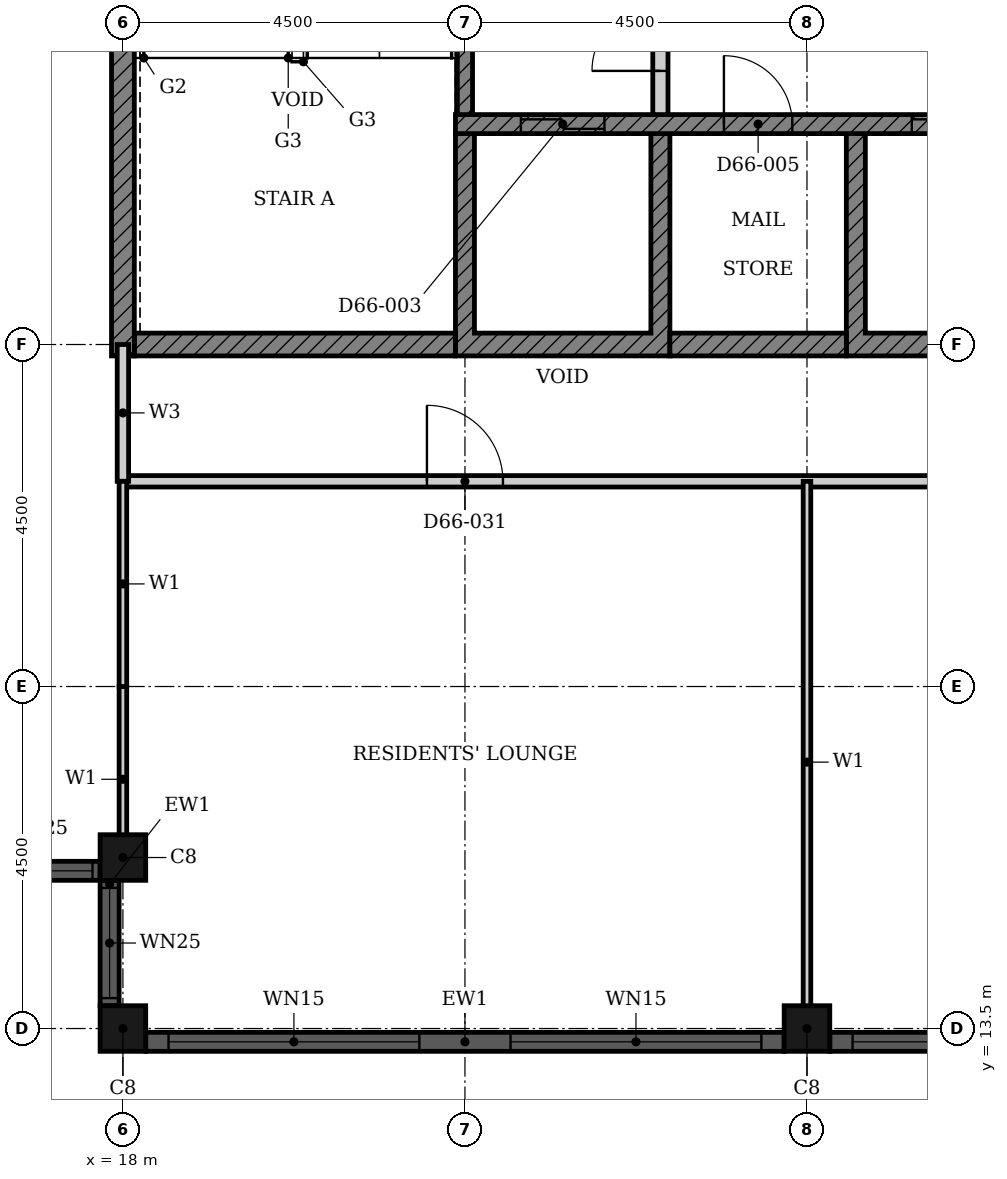
"""IFC4 building model, lengths in metres.
Left out: names, types, materials, properties, quantities, classifications, styles, units other than length and angle.
Written with IfcOpenShell. Run it as: python <this file> out.ifc"""

import sys

from ifc_helpers import new_model, si_unit, direction, frame, frame_2d, origin, origin_2d, place, context, subcontext, project, spatial, polyline, rectangle, hollow_rectangle, outline, extrude, element, fill, save


model = new_model("IFC4")
c1 = context("Model", 3, precision=1e-05, world=origin(), true_north=direction((0.0, 1.0)))
c2 = subcontext(c1, "Body", "Model", "MODEL_VIEW")
j1 = project(units=[si_unit("LENGTHUNIT", "METRE"), si_unit("PLANEANGLEUNIT", "RADIAN")], contexts=[c1])
p1 = place(None, origin())
s1 = spatial("IfcSite", under=j1, at=p1, CompositionType="ELEMENT")
p2 = place(p1, origin())
s2 = spatial("IfcBuilding", under=s1, at=p2, CompositionType="ELEMENT")
p3 = place(p2, frame((0.0, 0.0, 260.1)))
s3 = spatial("IfcBuildingStorey", under=s2, at=p3, CompositionType="ELEMENT", Elevation=260.1)
for number, where, z_axis, x_axis in (
    (1, (18.0, 15.75, 0.0), (0.0, 0.0, 1.0), (1.0, 0.0, 0.0)),
    (2, (18.0, 13.5, 0.0), (0.0, 0.0, 1.0), (1.0, 0.0, 0.0)),
    (3, (27.0, 13.5, 0.0), (0.0, 0.0, 1.0), (1.0, 0.0, 0.0)),
):
    element("IfcColumn", number, at=place(p3, frame(where, z_axis=z_axis, x_axis=x_axis)), inside=s3, PredefinedType="COLUMN", context=c2, shape_type="SweptSolid", body=[
        extrude(hollow_rectangle(XDim=0.6, YDim=0.6, WallThickness=0.02, at=origin_2d()), origin(), (0.0, 0.0, 1.0), 3.7),
    ])
p4 = place(p3, frame((16.05, 15.575, 0.0), z_axis=(0.0, 0.0, 1.0), x_axis=(1.0, 0.0, 0.0)))
e4 = element("IfcWall", 4, at=p4, inside=s3, PredefinedType="SOLIDWALL", context=c2, shape_type="SweptSolid", body=[
    extrude(rectangle(XDim=1.65, YDim=0.25, at=frame_2d((0.825, 0.0))), origin(), (0.0, 0.0, 1.0), 3.7),
])
p5 = place(p4, frame((0.1, 0.0, 0.9)))
e5 = element("IfcOpeningElement", 5, at=p5, cuts=e4, PredefinedType="OPENING", context=c2, shape_type="SweptSolid", body=[
    extrude(rectangle(XDim=1.45, YDim=1.85, at=frame_2d((0.725, 0.925))), frame((0.0, 0.135, 0.0), z_axis=(0.0, -1.0, 0.0), x_axis=(1.0, 0.0, 0.0)), (0.0, 0.0, 1.0), 0.27),
])
p6 = place(p3, frame((17.825, 15.45, 0.0), z_axis=(0.0, 0.0, 1.0), x_axis=(0.0, -1.0, 0.0)))
e6 = element("IfcWall", 6, at=p6, inside=s3, PredefinedType="SOLIDWALL", context=c2, shape_type="SweptSolid", body=[
    extrude(rectangle(XDim=1.65, YDim=0.25, at=frame_2d((0.825, 0.0))), origin(), (0.0, 0.0, 1.0), 3.7),
])
p7 = place(p6, frame((0.1, 0.0, 0.9)))
e7 = element("IfcOpeningElement", 7, at=p7, cuts=e6, PredefinedType="OPENING", context=c2, shape_type="SweptSolid", body=[
    extrude(rectangle(XDim=1.45, YDim=1.85, at=frame_2d((0.725, 0.925))), frame((0.0, 0.135, 0.0), z_axis=(0.0, -1.0, 0.0), x_axis=(1.0, 0.0, 0.0)), (0.0, 0.0, 1.0), 0.27),
])
p8 = place(p3, frame((18.3, 13.325, 0.0), z_axis=(0.0, 0.0, 1.0), x_axis=(1.0, 0.0, 0.0)))
e8 = element("IfcWall", 8, at=p8, inside=s3, PredefinedType="SOLIDWALL", context=c2, shape_type="SweptSolid", body=[
    extrude(rectangle(XDim=8.4, YDim=0.25, at=frame_2d((4.2, 0.0))), origin(), (0.0, 0.0, 1.0), 3.7),
])
p9 = place(p8, frame((0.3, 0.0, 0.45)))
e9 = element("IfcOpeningElement", 9, at=p9, cuts=e8, PredefinedType="OPENING", context=c2, shape_type="SweptSolid", body=[
    extrude(rectangle(XDim=3.3, YDim=2.3, at=frame_2d((1.65, 1.15))), frame((0.0, 0.135, 0.0), z_axis=(0.0, -1.0, 0.0), x_axis=(1.0, 0.0, 0.0)), (0.0, 0.0, 1.0), 0.27),
])
p10 = place(p8, frame((4.8, 0.0, 0.45)))
e10 = element("IfcOpeningElement", 10, at=p10, cuts=e8, PredefinedType="OPENING", context=c2, shape_type="SweptSolid", body=[
    extrude(rectangle(XDim=3.3, YDim=2.3, at=frame_2d((1.65, 1.15))), frame((0.0, 0.135, 0.0), z_axis=(0.0, -1.0, 0.0), x_axis=(1.0, 0.0, 0.0)), (0.0, 0.0, 1.0), 0.27),
])
p11 = place(p3, frame((27.3, 13.325, 0.0), z_axis=(0.0, 0.0, 1.0), x_axis=(1.0, 0.0, 0.0)))
e11 = element("IfcWall", 11, at=p11, inside=s3, PredefinedType="SOLIDWALL", context=c2, shape_type="SweptSolid", body=[
    extrude(rectangle(XDim=8.4, YDim=0.25, at=frame_2d((4.2, 0.0))), origin(), (0.0, 0.0, 1.0), 3.7),
])
p12 = place(p11, frame((0.3, 0.0, 0.45)))
e12 = element("IfcOpeningElement", 12, at=p12, cuts=e11, PredefinedType="OPENING", context=c2, shape_type="SweptSolid", body=[
    extrude(rectangle(XDim=3.3, YDim=2.3, at=frame_2d((1.65, 1.15))), frame((0.0, 0.135, 0.0), z_axis=(0.0, -1.0, 0.0), x_axis=(1.0, 0.0, 0.0)), (0.0, 0.0, 1.0), 0.27),
])
p13 = place(p11, frame((4.8, 0.0, 0.45)))
e13 = element("IfcOpeningElement", 13, at=p13, cuts=e11, PredefinedType="OPENING", context=c2, shape_type="SweptSolid", body=[
    extrude(rectangle(XDim=3.3, YDim=2.3, at=frame_2d((1.65, 1.15))), frame((0.0, 0.135, 0.0), z_axis=(0.0, -1.0, 0.0), x_axis=(1.0, 0.0, 0.0)), (0.0, 0.0, 1.0), 0.27),
])
p14 = place(p3, origin())
e14 = element("IfcWall", 14, at=p14, inside=s3, PredefinedType="SHEAR", context=c2, shape_type="SweptSolid", body=[
    extrude(outline(polyline([(22.375, 22.35), (25.197, 22.35), (25.197, 25.275), (24.947, 25.275), (24.947, 22.65), (22.625, 22.65), (22.625, 25.275), (22.375, 25.275), (22.375, 22.35)])), origin(), (0.0, 0.0, 1.0), 3.4),
])
p15 = place(p3, origin())
e15 = element("IfcWall", 15, at=p15, inside=s3, PredefinedType="SHEAR", context=c2, shape_type="SweptSolid", body=[
    extrude(outline(polyline([(27.518, 22.35), (30.339, 22.35), (30.339, 25.275), (30.089, 25.275), (30.089, 22.65), (27.768, 22.65), (27.768, 25.275), (27.518, 25.275), (27.518, 22.35)])), origin(), (0.0, 0.0, 1.0), 3.4),
])
p16 = place(p3, frame((18.15, 22.5, 0.0), z_axis=(0.0, 0.0, 1.0), x_axis=(1.0, 0.0, 0.0)))
e16 = element("IfcWall", 16, at=p16, inside=s3, PredefinedType="SHEAR", context=c2, shape_type="SweptSolid", body=[
    extrude(rectangle(XDim=4.225, YDim=0.3, at=frame_2d((2.113, 0.0))), origin(), (0.0, 0.0, 1.0), 3.4),
])
p17 = place(p3, frame((25.197, 22.5, 0.0), z_axis=(0.0, 0.0, 1.0), x_axis=(1.0, 0.0, 0.0)))
e17 = element("IfcWall", 17, at=p17, inside=s3, PredefinedType="SHEAR", context=c2, shape_type="SweptSolid", body=[
    extrude(rectangle(XDim=2.321, YDim=0.3, at=frame_2d((1.161, 0.0))), origin(), (0.0, 0.0, 1.0), 3.4),
])
p18 = place(p3, frame((18.0, 22.35, 0.0), z_axis=(0.0, 0.0, 1.0), x_axis=(0.0, 1.0, 0.0)))
e18 = element("IfcWall", 18, at=p18, inside=s3, PredefinedType="SHEAR", context=c2, shape_type="SweptSolid", body=[
    extrude(rectangle(XDim=9.3, YDim=0.3, at=frame_2d((4.65, 0.0))), origin(), (0.0, 0.0, 1.0), 3.4),
])
p19 = place(p3, frame((22.375, 25.4, 0.0), z_axis=(0.0, 0.0, 1.0), x_axis=(1.0, 0.0, 0.0)))
e19 = element("IfcWall", 19, at=p19, inside=s3, PredefinedType="SHEAR", context=c2, shape_type="SweptSolid", body=[
    extrude(rectangle(XDim=15.678, YDim=0.25, at=frame_2d((7.839, 0.0))), origin(), (0.0, 0.0, 1.0), 3.4),
])
p20 = place(p19, frame((6.004, 0.0, 0.0)))
e20 = element("IfcOpeningElement", 20, at=p20, cuts=e19, PredefinedType="OPENING", context=c2, shape_type="SweptSolid", body=[
    extrude(rectangle(XDim=1.1, YDim=2.1, at=frame_2d((0.55, 1.05))), frame((0.0, 0.135, 0.0), z_axis=(0.0, -1.0, 0.0), x_axis=(1.0, 0.0, 0.0)), (0.0, 0.0, 1.0), 0.27),
])
p21 = place(p19, frame((0.861, 0.0, 0.0)))
e21 = element("IfcOpeningElement", 21, at=p21, cuts=e19, PredefinedType="OPENING", context=c2, shape_type="SweptSolid", body=[
    extrude(rectangle(XDim=1.1, YDim=2.1, at=frame_2d((0.55, 1.05))), frame((0.0, 0.135, 0.0), z_axis=(0.0, -1.0, 0.0), x_axis=(1.0, 0.0, 0.0)), (0.0, 0.0, 1.0), 0.27),
])
p22 = place(p19, frame((3.532, 0.0, 0.0)))
e22 = element("IfcOpeningElement", 22, at=p22, cuts=e19, PredefinedType="OPENING", context=c2, shape_type="SweptSolid", body=[
    extrude(rectangle(XDim=0.9, YDim=2.1, at=frame_2d((0.45, 1.05))), frame((0.0, 0.135, 0.0), z_axis=(0.0, -1.0, 0.0), x_axis=(1.0, 0.0, 0.0)), (0.0, 0.0, 1.0), 0.27),
])
p23 = place(p19, frame((9.961, 0.0, 0.0)))
e23 = element("IfcOpeningElement", 23, at=p23, cuts=e19, PredefinedType="OPENING", context=c2, shape_type="SweptSolid", body=[
    extrude(rectangle(XDim=0.9, YDim=2.1, at=frame_2d((0.45, 1.05))), frame((0.0, 0.135, 0.0), z_axis=(0.0, -1.0, 0.0), x_axis=(1.0, 0.0, 0.0)), (0.0, 0.0, 1.0), 0.27),
])
p24 = place(p19, frame((13.818, 0.0, 0.0)))
e24 = element("IfcOpeningElement", 24, at=p24, cuts=e19, PredefinedType="OPENING", context=c2, shape_type="SweptSolid", body=[
    extrude(rectangle(XDim=0.9, YDim=2.1, at=frame_2d((0.45, 1.05))), frame((0.0, 0.135, 0.0), z_axis=(0.0, -1.0, 0.0), x_axis=(1.0, 0.0, 0.0)), (0.0, 0.0, 1.0), 0.27),
])
p25 = place(p3, frame((22.5, 31.35, 0.0), z_axis=(0.0, 0.0, 1.0), x_axis=(0.0, -1.0, 0.0)))
e25 = element("IfcWall", 25, at=p25, inside=s3, PredefinedType="SHEAR", context=c2, shape_type="SweptSolid", body=[
    extrude(rectangle(XDim=5.825, YDim=0.2, at=frame_2d((2.913, 0.0))), origin(), (0.0, 0.0, 1.0), 3.4),
])
p26 = place(p25, frame((0.25, 0.0, 0.0)))
e26 = element("IfcOpeningElement", 26, at=p26, cuts=e25, PredefinedType="OPENING", context=c2, shape_type="SweptSolid", body=[
    extrude(rectangle(XDim=1.8, YDim=2.1, at=frame_2d((0.9, 1.05))), frame((0.0, 0.11, 0.0), z_axis=(0.0, -1.0, 0.0), x_axis=(1.0, 0.0, 0.0)), (0.0, 0.0, 1.0), 0.22),
])
p27 = place(p3, frame((25.072, 25.525, 0.0), z_axis=(0.0, 0.0, 1.0), x_axis=(0.0, 1.0, 0.0)))
e27 = element("IfcWall", 27, at=p27, inside=s3, PredefinedType="PARTITIONING", context=c2, shape_type="SweptSolid", body=[
    extrude(rectangle(XDim=2.95, YDim=0.2, at=frame_2d((1.475, 0.0))), origin(), (0.0, 0.0, 1.0), 3.4),
])
p28 = place(p27, frame((0.575, 0.0, 0.0)))
e28 = element("IfcOpeningElement", 28, at=p28, cuts=e27, PredefinedType="OPENING", context=c2, shape_type="SweptSolid", body=[
    extrude(rectangle(XDim=1.8, YDim=2.1, at=frame_2d((0.9, 1.05))), frame((0.0, 0.11, 0.0), z_axis=(0.0, -1.0, 0.0), x_axis=(1.0, 0.0, 0.0)), (0.0, 0.0, 1.0), 0.22),
])
p29 = place(p3, frame((18.0, 20.7, 0.0), z_axis=(0.0, 0.0, 1.0), x_axis=(1.0, 0.0, 0.0)))
e29 = element("IfcWall", 29, at=p29, inside=s3, PredefinedType="PARTITIONING", context=c2, shape_type="SweptSolid", body=[
    extrude(rectangle(XDim=24.6, YDim=0.15, at=frame_2d((12.3, 0.0))), origin(), (0.0, 0.0, 1.0), 3.4),
])
p30 = place(p29, frame((4.0, 0.0, 0.0)))
e30 = element("IfcOpeningElement", 30, at=p30, cuts=e29, PredefinedType="OPENING", context=c2, shape_type="SweptSolid", body=[
    extrude(rectangle(XDim=1.0, YDim=2.1, at=frame_2d((0.5, 1.05))), frame((0.0, 0.085, 0.0), z_axis=(0.0, -1.0, 0.0), x_axis=(1.0, 0.0, 0.0)), (0.0, 0.0, 1.0), 0.17),
])
p31 = place(p29, frame((13.0, 0.0, 0.0)))
e31 = element("IfcOpeningElement", 31, at=p31, cuts=e29, PredefinedType="OPENING", context=c2, shape_type="SweptSolid", body=[
    extrude(rectangle(XDim=1.0, YDim=2.1, at=frame_2d((0.5, 1.05))), frame((0.0, 0.085, 0.0), z_axis=(0.0, -1.0, 0.0), x_axis=(1.0, 0.0, 0.0)), (0.0, 0.0, 1.0), 0.17),
])
p32 = place(p29, frame((22.3, 0.0, 0.0)))
e32 = element("IfcOpeningElement", 32, at=p32, cuts=e29, PredefinedType="OPENING", context=c2, shape_type="SweptSolid", body=[
    extrude(rectangle(XDim=1.0, YDim=2.2, at=frame_2d((0.5, 1.1))), frame((0.0, 0.085, 0.0), z_axis=(0.0, -1.0, 0.0), x_axis=(1.0, 0.0, 0.0)), (0.0, 0.0, 1.0), 0.17),
])
p33 = place(p3, frame((18.0, 20.7, 0.0), z_axis=(0.0, 0.0, 1.0), x_axis=(0.0, 1.0, 0.0)))
e33 = element("IfcWall", 33, at=p33, inside=s3, PredefinedType="PARTITIONING", context=c2, shape_type="SweptSolid", body=[
    extrude(rectangle(XDim=1.8, YDim=0.15, at=frame_2d((0.9, 0.0))), origin(), (0.0, 0.0, 1.0), 3.4),
])
p34 = place(p3, frame((18.0, 15.56, 0.0), z_axis=(0.0, 0.0, 1.0), x_axis=(0.0, 1.0, 0.0)))
e34 = element("IfcWall", 34, at=p34, inside=s3, PredefinedType="PARTITIONING", context=c2, shape_type="SweptSolid", body=[
    extrude(rectangle(XDim=2.439, YDim=0.1, at=frame_2d((1.219, 0.0))), origin(), (0.0, 0.0, 1.0), 3.4),
])
p35 = place(p3, frame((18.0, 18.0, 0.0), z_axis=(0.0, 0.0, 1.0), x_axis=(0.0, 1.0, 0.0)))
e35 = element("IfcWall", 35, at=p35, inside=s3, PredefinedType="PARTITIONING", context=c2, shape_type="SweptSolid", body=[
    extrude(rectangle(XDim=2.7, YDim=0.1, at=frame_2d((1.35, 0.0))), origin(), (0.0, 0.0, 1.0), 3.4),
])
p36 = place(p3, frame((27.0, 13.31, 0.0), z_axis=(0.0, 0.0, 1.0), x_axis=(0.0, 1.0, 0.0)))
e36 = element("IfcWall", 36, at=p36, inside=s3, PredefinedType="PARTITIONING", context=c2, shape_type="SweptSolid", body=[
    extrude(rectangle(XDim=7.39, YDim=0.1, at=frame_2d((3.695, 0.0))), origin(), (0.0, 0.0, 1.0), 3.4),
])
p37 = place(p5, origin())
e37 = element("IfcWindow", 37, at=p37, inside=s3, PartitioningType="SINGLE_PANEL", PredefinedType="WINDOW", context=c2, shape_type="SweptSolid", body=[
    extrude(rectangle(XDim=1.45, YDim=1.85, at=frame_2d((0.725, 0.925))), frame((0.0, 0.03, 0.0), z_axis=(0.0, -1.0, 0.0), x_axis=(1.0, 0.0, 0.0)), (0.0, 0.0, 1.0), 0.06),
])
fill(e5, e37)
p38 = place(p7, origin())
e38 = element("IfcWindow", 38, at=p38, inside=s3, PartitioningType="SINGLE_PANEL", PredefinedType="WINDOW", context=c2, shape_type="SweptSolid", body=[
    extrude(rectangle(XDim=1.45, YDim=1.85, at=frame_2d((0.725, 0.925))), frame((0.0, 0.03, 0.0), z_axis=(0.0, -1.0, 0.0), x_axis=(1.0, 0.0, 0.0)), (0.0, 0.0, 1.0), 0.06),
])
fill(e7, e38)
p39 = place(p9, origin())
e39 = element("IfcWindow", 39, at=p39, inside=s3, PartitioningType="SINGLE_PANEL", PredefinedType="WINDOW", context=c2, shape_type="SweptSolid", body=[
    extrude(rectangle(XDim=3.3, YDim=2.3, at=frame_2d((1.65, 1.15))), frame((0.0, 0.03, 0.0), z_axis=(0.0, -1.0, 0.0), x_axis=(1.0, 0.0, 0.0)), (0.0, 0.0, 1.0), 0.06),
])
fill(e9, e39)
p40 = place(p10, origin())
e40 = element("IfcWindow", 40, at=p40, inside=s3, PartitioningType="SINGLE_PANEL", PredefinedType="WINDOW", context=c2, shape_type="SweptSolid", body=[
    extrude(rectangle(XDim=3.3, YDim=2.3, at=frame_2d((1.65, 1.15))), frame((0.0, 0.03, 0.0), z_axis=(0.0, -1.0, 0.0), x_axis=(1.0, 0.0, 0.0)), (0.0, 0.0, 1.0), 0.06),
])
fill(e10, e40)
p41 = place(p12, origin())
e41 = element("IfcWindow", 41, at=p41, inside=s3, PartitioningType="SINGLE_PANEL", PredefinedType="WINDOW", context=c2, shape_type="SweptSolid", body=[
    extrude(rectangle(XDim=3.3, YDim=2.3, at=frame_2d((1.65, 1.15))), frame((0.0, 0.03, 0.0), z_axis=(0.0, -1.0, 0.0), x_axis=(1.0, 0.0, 0.0)), (0.0, 0.0, 1.0), 0.06),
])
fill(e12, e41)
p42 = place(p20, origin())
e42 = element("IfcDoor", 42, at=p42, inside=s3, OperationType="DOUBLE_DOOR_SLIDING", PredefinedType="DOOR", context=c2, shape_type="SweptSolid", body=[
    extrude(rectangle(XDim=1.1, YDim=2.1, at=frame_2d((0.55, 1.05))), frame((0.0, 0.025, 0.0), z_axis=(0.0, -1.0, 0.0), x_axis=(1.0, 0.0, 0.0)), (0.0, 0.0, 1.0), 0.05),
])
fill(e20, e42)
p43 = place(p21, origin())
e43 = element("IfcDoor", 43, at=p43, inside=s3, OperationType="DOUBLE_DOOR_SLIDING", PredefinedType="DOOR", context=c2, shape_type="SweptSolid", body=[
    extrude(rectangle(XDim=1.1, YDim=2.1, at=frame_2d((0.55, 1.05))), frame((0.0, 0.025, 0.0), z_axis=(0.0, -1.0, 0.0), x_axis=(1.0, 0.0, 0.0)), (0.0, 0.0, 1.0), 0.05),
])
fill(e21, e43)
p44 = place(p22, origin())
e44 = element("IfcDoor", 44, at=p44, inside=s3, OperationType="SINGLE_SWING_LEFT", PredefinedType="DOOR", context=c2, shape_type="SweptSolid", body=[
    extrude(rectangle(XDim=0.9, YDim=2.1, at=frame_2d((0.45, 1.05))), frame((0.0, 0.025, 0.0), z_axis=(0.0, -1.0, 0.0), x_axis=(1.0, 0.0, 0.0)), (0.0, 0.0, 1.0), 0.05),
])
fill(e22, e44)
p45 = place(p28, origin())
e45 = element("IfcDoor", 45, at=p45, inside=s3, OperationType="DOUBLE_DOOR_SINGLE_SWING", PredefinedType="DOOR", context=c2, shape_type="SweptSolid", body=[
    extrude(rectangle(XDim=1.8, YDim=2.1, at=frame_2d((0.9, 1.05))), frame((0.0, 0.025, 0.0), z_axis=(0.0, -1.0, 0.0), x_axis=(1.0, 0.0, 0.0)), (0.0, 0.0, 1.0), 0.05),
])
fill(e28, e45)
p46 = place(p30, origin())
e46 = element("IfcDoor", 46, at=p46, inside=s3, OperationType="SINGLE_SWING_LEFT", PredefinedType="DOOR", context=c2, shape_type="SweptSolid", body=[
    extrude(rectangle(XDim=1.0, YDim=2.1, at=frame_2d((0.5, 1.05))), frame((0.0, 0.025, 0.0), z_axis=(0.0, -1.0, 0.0), x_axis=(1.0, 0.0, 0.0)), (0.0, 0.0, 1.0), 0.05),
])
fill(e30, e46)
save(model, sys.argv[1])
